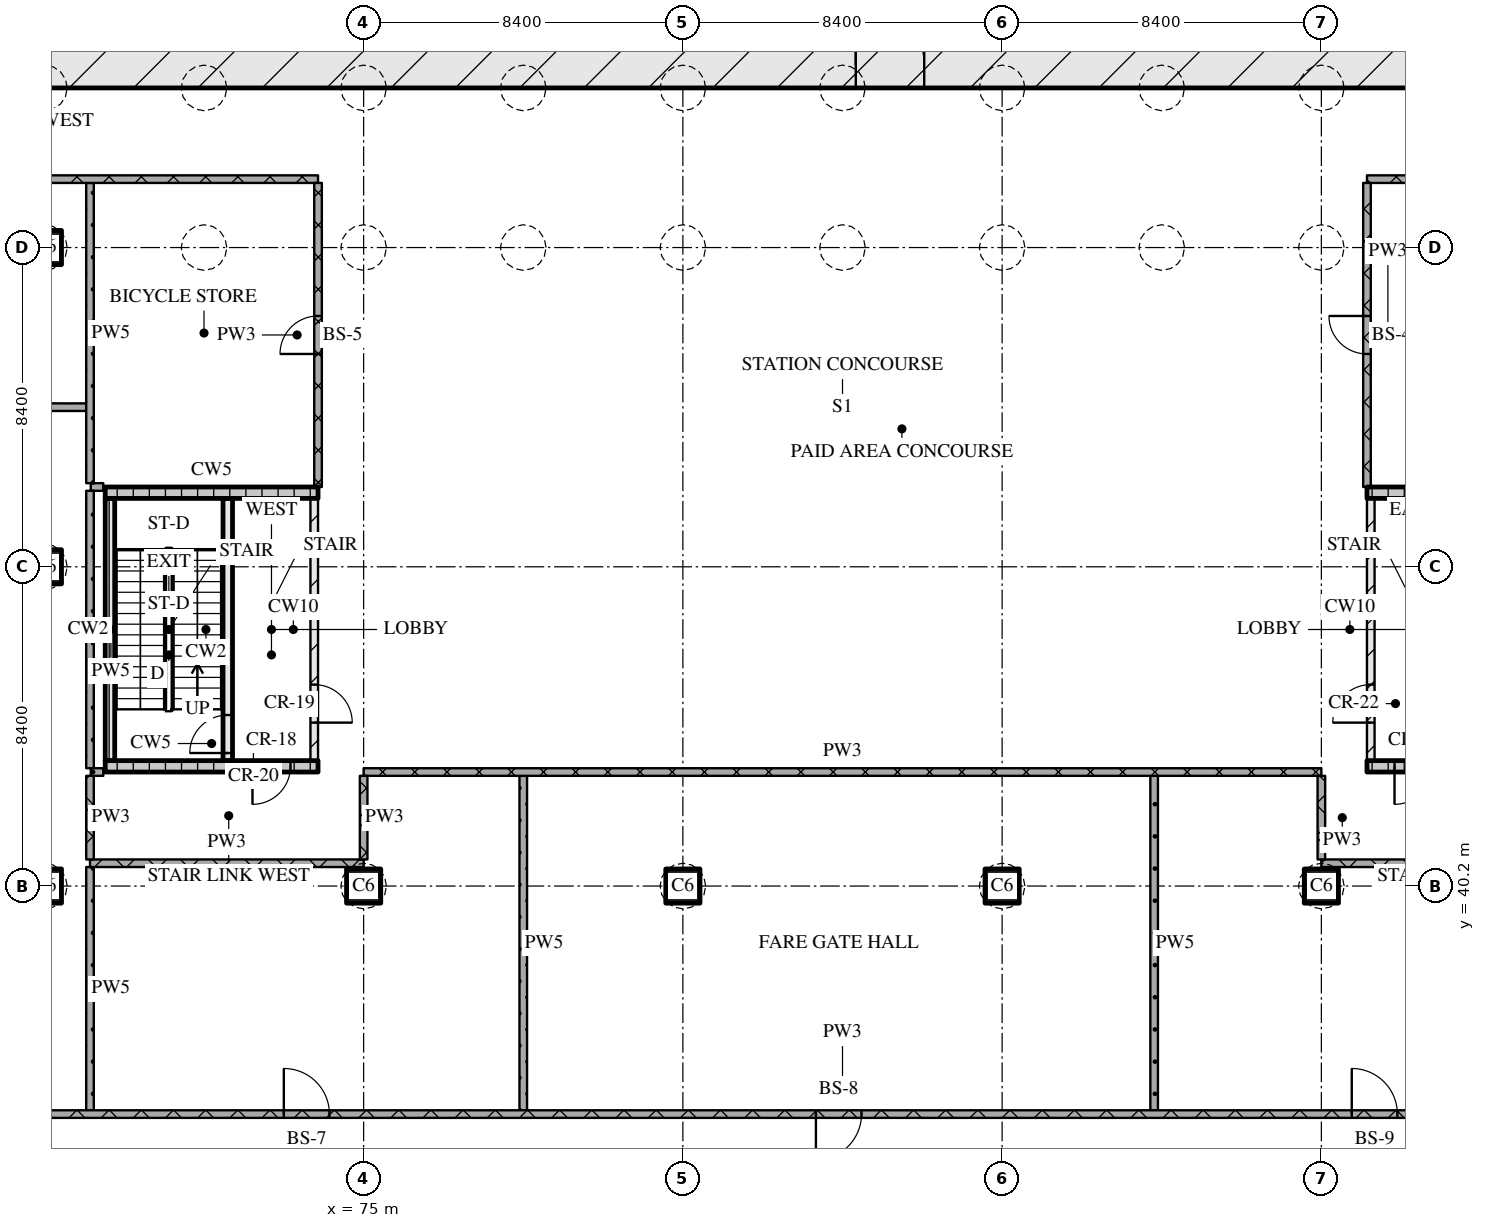
"""IFC4 building model, lengths in metres.
Left out: names, types, materials, properties, quantities, classifications, styles, units other than length and angle.
Written with IfcOpenShell. Run it as: python <this file> out.ifc"""

import sys

from ifc_helpers import new_model, si_unit, direction, frame, frame_2d, origin, origin_2d, place, context, subcontext, project, spatial, rectangle, extrude, element, fill, save


model = new_model("IFC4")
c1 = context("Model", 3, precision=1e-05, world=origin(), true_north=direction((0.0, 1.0)))
c2 = subcontext(c1, "Body", "Model", "MODEL_VIEW")
j1 = project(units=[si_unit("LENGTHUNIT", "METRE"), si_unit("PLANEANGLEUNIT", "RADIAN")], contexts=[c1])
p1 = place(None, origin())
s1 = spatial("IfcSite", under=j1, at=p1, CompositionType="ELEMENT")
p2 = place(p1, origin())
s2 = spatial("IfcBuilding", under=s1, at=p2, CompositionType="ELEMENT")
p3 = place(p2, frame((0.0, 0.0, -6.0)))
s3 = spatial("IfcBuildingStorey", under=s2, at=p3, CompositionType="ELEMENT", Elevation=-6.0)
for number, where, z_axis, x_axis in (
    (1, (66.6, 40.2, 0.0), (0.0, 0.0, 1.0), (1.0, 0.0, 0.0)),
    (2, (66.6, 48.6, 0.0), (0.0, 0.0, 1.0), (1.0, 0.0, 0.0)),
    (3, (66.6, 57.0, 0.0), (0.0, 0.0, 1.0), (1.0, 0.0, 0.0)),
    (4, (75.0, 40.2, 0.0), (0.0, 0.0, 1.0), (1.0, 0.0, 0.0)),
    (5, (83.4, 40.2, 0.0), (0.0, 0.0, 1.0), (1.0, 0.0, 0.0)),
    (6, (91.8, 40.2, 0.0), (0.0, 0.0, 1.0), (1.0, 0.0, 0.0)),
    (7, (100.2, 40.2, 0.0), (0.0, 0.0, 1.0), (1.0, 0.0, 0.0)),
):
    element("IfcColumn", number, at=place(p3, frame(where, z_axis=z_axis, x_axis=x_axis)), inside=s3, PredefinedType="COLUMN", context=c2, shape_type="SweptSolid", body=[
        extrude(rectangle(XDim=0.9, YDim=0.9, at=origin_2d()), origin(), (0.0, 0.0, 1.0), 6.0),
    ])
p4 = place(p3, frame((66.6, 61.8, 0.0), z_axis=(0.0, 0.0, 1.0), x_axis=(1.0, 0.0, 0.0)))
e8 = element("IfcWall", 8, at=p4, inside=s3, PredefinedType="SOLIDWALL", context=c2, shape_type="SweptSolid", body=[
    extrude(rectangle(XDim=42.0, YDim=1.2, at=frame_2d((21.0, 0.0))), origin(), (0.0, 0.0, 1.0), 5.7),
])
p5 = place(p4, frame((21.35, 0.0, 0.0)))
e9 = element("IfcOpeningElement", 9, at=p5, cuts=e8, PredefinedType="OPENING", context=c2, shape_type="SweptSolid", body=[
    extrude(rectangle(XDim=1.8, YDim=2.1, at=frame_2d((0.9, 1.05))), frame((0.0, 0.61, 0.0), z_axis=(0.0, -1.0, 0.0), x_axis=(1.0, 0.0, 0.0)), (0.0, 0.0, 1.0), 1.22),
])
p6 = place(p3, frame((68.2, 43.35, 0.0), z_axis=(0.0, 0.0, 1.0), x_axis=(1.0, 0.0, 0.0)))
e10 = element("IfcWall", 10, at=p6, inside=s3, PredefinedType="SOLIDWALL", context=c2, shape_type="SweptSolid", body=[
    extrude(rectangle(XDim=5.6, YDim=0.3, at=frame_2d((2.8, 0.0))), origin(), (0.0, 0.0, 1.0), 5.7),
])
p7 = place(p6, frame((3.875, 0.0, 0.0)))
e11 = element("IfcOpeningElement", 11, at=p7, cuts=e10, PredefinedType="OPENING", context=c2, shape_type="SweptSolid", body=[
    extrude(rectangle(XDim=1.0, YDim=2.1, at=frame_2d((0.5, 1.05))), frame((0.0, 0.16, 0.0), z_axis=(0.0, -1.0, 0.0), x_axis=(1.0, 0.0, 0.0)), (0.0, 0.0, 1.0), 0.32),
])
p8 = place(p3, frame((68.325, 43.5, 0.0), z_axis=(0.0, 0.0, 1.0), x_axis=(0.0, 1.0, 0.0)))
e12 = element("IfcWall", 12, at=p8, inside=s3, PredefinedType="SOLIDWALL", context=c2, shape_type="SweptSolid", body=[
    extrude(rectangle(XDim=6.9, YDim=0.25, at=frame_2d((3.45, 0.0))), origin(), (0.0, 0.0, 1.0), 5.7),
])
p9 = place(p3, frame((71.425, 43.5, 0.0), z_axis=(0.0, 0.0, 1.0), x_axis=(0.0, 1.0, 0.0)))
e13 = element("IfcWall", 13, at=p9, inside=s3, PredefinedType="SOLIDWALL", context=c2, shape_type="SweptSolid", body=[
    extrude(rectangle(XDim=6.9, YDim=0.25, at=frame_2d((3.45, 0.0))), origin(), (0.0, 0.0, 1.0), 5.7),
])
p10 = place(p9, frame((0.2, 0.0, 0.0)))
e14 = element("IfcOpeningElement", 14, at=p10, cuts=e13, PredefinedType="OPENING", context=c2, shape_type="SweptSolid", body=[
    extrude(rectangle(XDim=1.0, YDim=2.1, at=frame_2d((0.5, 1.05))), frame((0.0, 0.135, 0.0), z_axis=(0.0, -1.0, 0.0), x_axis=(1.0, 0.0, 0.0)), (0.0, 0.0, 1.0), 0.27),
])
p11 = place(p3, frame((73.7, 43.5, 0.0), z_axis=(0.0, 0.0, 1.0), x_axis=(0.0, 1.0, 0.0)))
e15 = element("IfcWall", 15, at=p11, inside=s3, PredefinedType="PARTITIONING", context=c2, shape_type="SweptSolid", body=[
    extrude(rectangle(XDim=6.9, YDim=0.2, at=frame_2d((3.45, 0.0))), origin(), (0.0, 0.0, 1.0), 5.7),
])
p12 = place(p11, frame((1.0, 0.0, 0.0)))
e16 = element("IfcOpeningElement", 16, at=p12, cuts=e15, PredefinedType="OPENING", context=c2, shape_type="SweptSolid", body=[
    extrude(rectangle(XDim=1.0, YDim=2.1, at=frame_2d((0.5, 1.05))), frame((0.0, 0.11, 0.0), z_axis=(0.0, -1.0, 0.0), x_axis=(1.0, 0.0, 0.0)), (0.0, 0.0, 1.0), 0.22),
])
p13 = place(p3, frame((68.2, 50.55, 0.0), z_axis=(0.0, 0.0, 1.0), x_axis=(1.0, 0.0, 0.0)))
e17 = element("IfcWall", 17, at=p13, inside=s3, PredefinedType="SOLIDWALL", context=c2, shape_type="SweptSolid", body=[
    extrude(rectangle(XDim=5.6, YDim=0.3, at=frame_2d((2.8, 0.0))), origin(), (0.0, 0.0, 1.0), 5.7),
])
p14 = place(p3, frame((101.4, 43.35, 0.0), z_axis=(0.0, 0.0, 1.0), x_axis=(1.0, 0.0, 0.0)))
e18 = element("IfcWall", 18, at=p14, inside=s3, PredefinedType="SOLIDWALL", context=c2, shape_type="SweptSolid", body=[
    extrude(rectangle(XDim=5.6, YDim=0.3, at=frame_2d((2.8, 0.0))), origin(), (0.0, 0.0, 1.0), 5.7),
])
p15 = place(p14, frame((0.725, 0.0, 0.0)))
e19 = element("IfcOpeningElement", 19, at=p15, cuts=e18, PredefinedType="OPENING", context=c2, shape_type="SweptSolid", body=[
    extrude(rectangle(XDim=1.0, YDim=2.1, at=frame_2d((0.5, 1.05))), frame((0.0, 0.16, 0.0), z_axis=(0.0, -1.0, 0.0), x_axis=(1.0, 0.0, 0.0)), (0.0, 0.0, 1.0), 0.32),
])
p16 = place(p3, frame((101.5, 43.5, 0.0), z_axis=(0.0, 0.0, 1.0), x_axis=(0.0, 1.0, 0.0)))
e20 = element("IfcWall", 20, at=p16, inside=s3, PredefinedType="PARTITIONING", context=c2, shape_type="SweptSolid", body=[
    extrude(rectangle(XDim=6.9, YDim=0.2, at=frame_2d((3.45, 0.0))), origin(), (0.0, 0.0, 1.0), 5.7),
])
p17 = place(p16, frame((1.0, 0.0, 0.0)))
e21 = element("IfcOpeningElement", 21, at=p17, cuts=e20, PredefinedType="OPENING", context=c2, shape_type="SweptSolid", body=[
    extrude(rectangle(XDim=1.0, YDim=2.1, at=frame_2d((0.5, 1.05))), frame((0.0, 0.11, 0.0), z_axis=(0.0, -1.0, 0.0), x_axis=(1.0, 0.0, 0.0)), (0.0, 0.0, 1.0), 0.22),
])
p18 = place(p3, frame((101.4, 50.55, 0.0), z_axis=(0.0, 0.0, 1.0), x_axis=(1.0, 0.0, 0.0)))
e22 = element("IfcWall", 22, at=p18, inside=s3, PredefinedType="SOLIDWALL", context=c2, shape_type="SweptSolid", body=[
    extrude(rectangle(XDim=5.6, YDim=0.3, at=frame_2d((2.8, 0.0))), origin(), (0.0, 0.0, 1.0), 5.7),
])
p19 = place(p3, frame((43.8, 34.2, 0.0), z_axis=(0.0, 0.0, 1.0), x_axis=(1.0, 0.0, 0.0)))
e23 = element("IfcWall", 23, at=p19, inside=s3, PredefinedType="PARTITIONING", context=c2, shape_type="SweptSolid", body=[
    extrude(rectangle(XDim=87.6, YDim=0.2, at=frame_2d((43.8, 0.0))), origin(), (0.0, 0.0, 1.0), 5.7),
])
p20 = place(p19, frame((29.1, 0.0, 0.0)))
e24 = element("IfcOpeningElement", 24, at=p20, cuts=e23, PredefinedType="OPENING", context=c2, shape_type="SweptSolid", body=[
    extrude(rectangle(XDim=1.2, YDim=2.1, at=frame_2d((0.6, 1.05))), frame((0.0, 0.11, 0.0), z_axis=(0.0, -1.0, 0.0), x_axis=(1.0, 0.0, 0.0)), (0.0, 0.0, 1.0), 0.22),
])
p21 = place(p19, frame((43.1, 0.0, 0.0)))
e25 = element("IfcOpeningElement", 25, at=p21, cuts=e23, PredefinedType="OPENING", context=c2, shape_type="SweptSolid", body=[
    extrude(rectangle(XDim=1.2, YDim=2.1, at=frame_2d((0.6, 1.05))), frame((0.0, 0.11, 0.0), z_axis=(0.0, -1.0, 0.0), x_axis=(1.0, 0.0, 0.0)), (0.0, 0.0, 1.0), 0.22),
])
p22 = place(p19, frame((57.2, 0.0, 0.0)))
e26 = element("IfcOpeningElement", 26, at=p22, cuts=e23, PredefinedType="OPENING", context=c2, shape_type="SweptSolid", body=[
    extrude(rectangle(XDim=1.2, YDim=2.1, at=frame_2d((0.6, 1.05))), frame((0.0, 0.11, 0.0), z_axis=(0.0, -1.0, 0.0), x_axis=(1.0, 0.0, 0.0)), (0.0, 0.0, 1.0), 0.22),
])
p23 = place(p19, frame((75.0, 0.0, 0.0)))
e27 = element("IfcOpeningElement", 27, at=p23, cuts=e23, PredefinedType="OPENING", context=c2, shape_type="SweptSolid", body=[
    extrude(rectangle(XDim=1.2, YDim=2.1, at=frame_2d((0.6, 1.05))), frame((0.0, 0.11, 0.0), z_axis=(0.0, -1.0, 0.0), x_axis=(1.0, 0.0, 0.0)), (0.0, 0.0, 1.0), 0.22),
])
for number, where, z_axis, x_axis in (
    (28, (67.8, 40.8, 0.0), (0.0, 0.0, 1.0), (1.0, 0.0, 0.0)),
    (29, (100.2, 40.8, 0.0), (0.0, 0.0, 1.0), (1.0, 0.0, 0.0)),
):
    element("IfcWall", number, at=place(p3, frame(where, z_axis=z_axis, x_axis=x_axis)), inside=s3, PredefinedType="PARTITIONING", context=c2, shape_type="SweptSolid", body=[
        extrude(rectangle(XDim=7.2, YDim=0.2, at=frame_2d((3.6, 0.0))), origin(), (0.0, 0.0, 1.0), 5.7),
    ])
p24 = place(p3, frame((75.0, 43.2, 0.0), z_axis=(0.0, 0.0, 1.0), x_axis=(1.0, 0.0, 0.0)))
e30 = element("IfcWall", 30, at=p24, inside=s3, PredefinedType="PARTITIONING", context=c2, shape_type="SweptSolid", body=[
    extrude(rectangle(XDim=25.2, YDim=0.2, at=frame_2d((12.6, 0.0))), origin(), (0.0, 0.0, 1.0), 5.7),
])
for number, where, z_axis, x_axis in (
    (31, (67.82, 43.2, 0.0), (0.0, 0.0, 1.0), (1.0, 0.0, 0.0)),
    (32, (67.82, 50.7, 0.0), (0.0, 0.0, 1.0), (1.0, 0.0, 0.0)),
):
    element("IfcWall", number, at=place(p3, frame(where, z_axis=z_axis, x_axis=x_axis)), inside=s3, PredefinedType="PARTITIONING", context=c2, shape_type="SweptSolid", body=[
        extrude(rectangle(XDim=0.33, YDim=0.2, at=frame_2d((0.165, 0.0))), origin(), (0.0, 0.0, 1.0), 5.7),
    ])
p25 = place(p3, frame((43.9, 52.8, 0.0), z_axis=(0.0, 0.0, 1.0), x_axis=(1.0, 0.0, 0.0)))
e33 = element("IfcWall", 33, at=p25, inside=s3, PredefinedType="PARTITIONING", context=c2, shape_type="SweptSolid", body=[
    extrude(rectangle(XDim=23.8, YDim=0.2, at=frame_2d((11.9, 0.0))), origin(), (0.0, 0.0, 1.0), 5.7),
])
p26 = place(p3, frame((73.8, 58.8, 0.0), z_axis=(0.0, 0.0, 1.0), x_axis=(-1.0, 0.0, 0.0)))
e34 = element("IfcWall", 34, at=p26, inside=s3, PredefinedType="PARTITIONING", context=c2, shape_type="SweptSolid", body=[
    extrude(rectangle(XDim=30.0, YDim=0.2, at=frame_2d((15.0, 0.0))), origin(), (0.0, 0.0, 1.0), 5.7),
])
p27 = place(p26, frame((17.4, 0.0, 0.0)))
e35 = element("IfcOpeningElement", 35, at=p27, cuts=e34, PredefinedType="OPENING", context=c2, shape_type="SweptSolid", body=[
    extrude(rectangle(XDim=1.2, YDim=2.1, at=frame_2d((0.6, 1.05))), frame((0.0, 0.11, 0.0), z_axis=(0.0, -1.0, 0.0), x_axis=(1.0, 0.0, 0.0)), (0.0, 0.0, 1.0), 0.22),
])
p28 = place(p3, frame((131.4, 58.8, 0.0), z_axis=(0.0, 0.0, 1.0), x_axis=(-1.0, 0.0, 0.0)))
e36 = element("IfcWall", 36, at=p28, inside=s3, PredefinedType="PARTITIONING", context=c2, shape_type="SweptSolid", body=[
    extrude(rectangle(XDim=30.0, YDim=0.2, at=frame_2d((15.0, 0.0))), origin(), (0.0, 0.0, 1.0), 5.7),
])
p29 = place(p28, frame((11.4, 0.0, 0.0)))
e37 = element("IfcOpeningElement", 37, at=p29, cuts=e36, PredefinedType="OPENING", context=c2, shape_type="SweptSolid", body=[
    extrude(rectangle(XDim=1.2, YDim=2.1, at=frame_2d((0.6, 1.05))), frame((0.0, 0.11, 0.0), z_axis=(0.0, -1.0, 0.0), x_axis=(1.0, 0.0, 0.0)), (0.0, 0.0, 1.0), 0.22),
])
p30 = place(p3, frame((67.8, 43.1, 0.0), z_axis=(0.0, 0.0, 1.0), x_axis=(0.0, -1.0, 0.0)))
e38 = element("IfcWall", 38, at=p30, inside=s3, PredefinedType="PARTITIONING", context=c2, shape_type="SweptSolid", body=[
    extrude(rectangle(XDim=2.2, YDim=0.2, at=frame_2d((1.1, 0.0))), origin(), (0.0, 0.0, 1.0), 5.7),
])
p31 = place(p3, frame((67.8, 50.6, 0.0), z_axis=(0.0, 0.0, 1.0), x_axis=(0.0, -1.0, 0.0)))
e39 = element("IfcWall", 39, at=p31, inside=s3, PredefinedType="PARTITIONING", context=c2, shape_type="SweptSolid", body=[
    extrude(rectangle(XDim=7.3, YDim=0.2, at=frame_2d((3.65, 0.0))), origin(), (0.0, 0.0, 1.0), 5.7),
])
p32 = place(p3, frame((67.8, 40.7, 0.0), z_axis=(0.0, 0.0, 1.0), x_axis=(0.0, -1.0, 0.0)))
e40 = element("IfcWall", 40, at=p32, inside=s3, PredefinedType="PARTITIONING", context=c2, shape_type="SweptSolid", body=[
    extrude(rectangle(XDim=6.4, YDim=0.2, at=frame_2d((3.2, 0.0))), origin(), (0.0, 0.0, 1.0), 5.7),
])
p33 = place(p3, frame((67.8, 58.7, 0.0), z_axis=(0.0, 0.0, 1.0), x_axis=(0.0, -1.0, 0.0)))
e41 = element("IfcWall", 41, at=p33, inside=s3, PredefinedType="PARTITIONING", context=c2, shape_type="SweptSolid", body=[
    extrude(rectangle(XDim=7.9, YDim=0.2, at=frame_2d((3.95, 0.0))), origin(), (0.0, 0.0, 1.0), 5.7),
])
p34 = place(p3, frame((73.8, 50.7, 0.0), z_axis=(0.0, 0.0, 1.0), x_axis=(0.0, 1.0, 0.0)))
e42 = element("IfcWall", 42, at=p34, inside=s3, PredefinedType="PARTITIONING", context=c2, shape_type="SweptSolid", body=[
    extrude(rectangle(XDim=8.0, YDim=0.2, at=frame_2d((4.0, 0.0))), origin(), (0.0, 0.0, 1.0), 5.7),
])
p35 = place(p34, frame((3.5, 0.0, 0.0)))
e43 = element("IfcOpeningElement", 43, at=p35, cuts=e42, PredefinedType="OPENING", context=c2, shape_type="SweptSolid", body=[
    extrude(rectangle(XDim=1.0, YDim=2.1, at=frame_2d((0.5, 1.05))), frame((0.0, 0.11, 0.0), z_axis=(0.0, -1.0, 0.0), x_axis=(1.0, 0.0, 0.0)), (0.0, 0.0, 1.0), 0.22),
])
p36 = place(p3, frame((75.0, 43.1, 0.0), z_axis=(0.0, 0.0, 1.0), x_axis=(0.0, -1.0, 0.0)))
e44 = element("IfcWall", 44, at=p36, inside=s3, PredefinedType="PARTITIONING", context=c2, shape_type="SweptSolid", body=[
    extrude(rectangle(XDim=2.2, YDim=0.2, at=frame_2d((1.1, 0.0))), origin(), (0.0, 0.0, 1.0), 5.7),
])
for number, where, z_axis, x_axis in (
    (45, (79.2, 43.1, 0.0), (0.0, 0.0, 1.0), (0.0, -1.0, 0.0)),
    (46, (95.8, 43.1, 0.0), (0.0, 0.0, 1.0), (0.0, -1.0, 0.0)),
):
    element("IfcWall", number, at=place(p3, frame(where, z_axis=z_axis, x_axis=x_axis)), inside=s3, PredefinedType="PARTITIONING", context=c2, shape_type="SweptSolid", body=[
        extrude(rectangle(XDim=8.8, YDim=0.2, at=frame_2d((4.4, 0.0))), origin(), (0.0, 0.0, 1.0), 5.7),
    ])
p37 = place(p3, frame((100.2, 43.1, 0.0), z_axis=(0.0, 0.0, 1.0), x_axis=(0.0, -1.0, 0.0)))
e47 = element("IfcWall", 47, at=p37, inside=s3, PredefinedType="PARTITIONING", context=c2, shape_type="SweptSolid", body=[
    extrude(rectangle(XDim=2.2, YDim=0.2, at=frame_2d((1.1, 0.0))), origin(), (0.0, 0.0, 1.0), 5.7),
])
p38 = place(p3, frame((101.4, 58.7, 0.0), z_axis=(0.0, 0.0, 1.0), x_axis=(0.0, -1.0, 0.0)))
e48 = element("IfcWall", 48, at=p38, inside=s3, PredefinedType="PARTITIONING", context=c2, shape_type="SweptSolid", body=[
    extrude(rectangle(XDim=8.0, YDim=0.2, at=frame_2d((4.0, 0.0))), origin(), (0.0, 0.0, 1.0), 5.7),
])
p39 = place(p38, frame((3.5, 0.0, 0.0)))
e49 = element("IfcOpeningElement", 49, at=p39, cuts=e48, PredefinedType="OPENING", context=c2, shape_type="SweptSolid", body=[
    extrude(rectangle(XDim=1.0, YDim=2.1, at=frame_2d((0.5, 1.05))), frame((0.0, 0.11, 0.0), z_axis=(0.0, -1.0, 0.0), x_axis=(1.0, 0.0, 0.0)), (0.0, 0.0, 1.0), 0.22),
])
p40 = place(p5, origin())
e50 = element("IfcDoor", 50, at=p40, inside=s3, OperationType="DOUBLE_DOOR_SINGLE_SWING", PredefinedType="DOOR", context=c2, shape_type="SweptSolid", body=[
    extrude(rectangle(XDim=1.8, YDim=2.1, at=frame_2d((0.9, 1.05))), frame((0.0, 0.025, 0.0), z_axis=(0.0, -1.0, 0.0), x_axis=(1.0, 0.0, 0.0)), (0.0, 0.0, 1.0), 0.05),
])
fill(e9, e50)
p41 = place(p7, origin())
e51 = element("IfcDoor", 51, at=p41, inside=s3, OperationType="SINGLE_SWING_RIGHT", PredefinedType="DOOR", context=c2, shape_type="SweptSolid", body=[
    extrude(rectangle(XDim=1.0, YDim=2.1, at=frame_2d((0.5, 1.05))), frame((0.0, 0.025, 0.0), z_axis=(0.0, -1.0, 0.0), x_axis=(1.0, 0.0, 0.0)), (0.0, 0.0, 1.0), 0.05),
])
fill(e11, e51)
p42 = place(p10, origin())
e52 = element("IfcDoor", 52, at=p42, inside=s3, OperationType="SINGLE_SWING_LEFT", PredefinedType="DOOR", context=c2, shape_type="SweptSolid", body=[
    extrude(rectangle(XDim=1.0, YDim=2.1, at=frame_2d((0.5, 1.05))), frame((0.0, 0.025, 0.0), z_axis=(0.0, -1.0, 0.0), x_axis=(1.0, 0.0, 0.0)), (0.0, 0.0, 1.0), 0.05),
])
fill(e14, e52)
p43 = place(p12, origin())
e53 = element("IfcDoor", 53, at=p43, inside=s3, OperationType="SINGLE_SWING_RIGHT", PredefinedType="DOOR", context=c2, shape_type="SweptSolid", body=[
    extrude(rectangle(XDim=1.0, YDim=2.1, at=frame_2d((0.5, 1.05))), frame((0.0, 0.025, 0.0), z_axis=(0.0, -1.0, 0.0), x_axis=(1.0, 0.0, 0.0)), (0.0, 0.0, 1.0), 0.05),
])
fill(e16, e53)
p44 = place(p15, origin())
e54 = element("IfcDoor", 54, at=p44, inside=s3, OperationType="SINGLE_SWING_RIGHT", PredefinedType="DOOR", context=c2, shape_type="SweptSolid", body=[
    extrude(rectangle(XDim=1.0, YDim=2.1, at=frame_2d((0.5, 1.05))), frame((0.0, 0.025, 0.0), z_axis=(0.0, -1.0, 0.0), x_axis=(1.0, 0.0, 0.0)), (0.0, 0.0, 1.0), 0.05),
])
fill(e19, e54)
p45 = place(p17, origin())
e55 = element("IfcDoor", 55, at=p45, inside=s3, OperationType="SINGLE_SWING_LEFT", PredefinedType="DOOR", context=c2, shape_type="SweptSolid", body=[
    extrude(rectangle(XDim=1.0, YDim=2.1, at=frame_2d((0.5, 1.05))), frame((0.0, 0.025, 0.0), z_axis=(0.0, -1.0, 0.0), x_axis=(1.0, 0.0, 0.0)), (0.0, 0.0, 1.0), 0.05),
])
fill(e21, e55)
p46 = place(p20, origin())
e56 = element("IfcDoor", 56, at=p46, inside=s3, OperationType="SINGLE_SWING_LEFT", PredefinedType="DOOR", context=c2, shape_type="SweptSolid", body=[
    extrude(rectangle(XDim=1.2, YDim=2.1, at=frame_2d((0.6, 1.05))), frame((0.0, 0.025, 0.0), z_axis=(0.0, -1.0, 0.0), x_axis=(1.0, 0.0, 0.0)), (0.0, 0.0, 1.0), 0.05),
])
fill(e24, e56)
p47 = place(p21, origin())
e57 = element("IfcDoor", 57, at=p47, inside=s3, OperationType="SINGLE_SWING_RIGHT", PredefinedType="DOOR", context=c2, shape_type="SweptSolid", body=[
    extrude(rectangle(XDim=1.2, YDim=2.1, at=frame_2d((0.6, 1.05))), frame((0.0, 0.025, 0.0), z_axis=(0.0, -1.0, 0.0), x_axis=(1.0, 0.0, 0.0)), (0.0, 0.0, 1.0), 0.05),
])
fill(e25, e57)
p48 = place(p22, origin())
e58 = element("IfcDoor", 58, at=p48, inside=s3, OperationType="SINGLE_SWING_LEFT", PredefinedType="DOOR", context=c2, shape_type="SweptSolid", body=[
    extrude(rectangle(XDim=1.2, YDim=2.1, at=frame_2d((0.6, 1.05))), frame((0.0, 0.025, 0.0), z_axis=(0.0, -1.0, 0.0), x_axis=(1.0, 0.0, 0.0)), (0.0, 0.0, 1.0), 0.05),
])
fill(e26, e58)
p49 = place(p35, origin())
e59 = element("IfcDoor", 59, at=p49, inside=s3, OperationType="SINGLE_SWING_LEFT", PredefinedType="DOOR", context=c2, shape_type="SweptSolid", body=[
    extrude(rectangle(XDim=1.0, YDim=2.1, at=frame_2d((0.5, 1.05))), frame((0.0, 0.025, 0.0), z_axis=(0.0, -1.0, 0.0), x_axis=(1.0, 0.0, 0.0)), (0.0, 0.0, 1.0), 0.05),
])
fill(e43, e59)
p50 = place(p39, origin())
e60 = element("IfcDoor", 60, at=p50, inside=s3, OperationType="SINGLE_SWING_RIGHT", PredefinedType="DOOR", context=c2, shape_type="SweptSolid", body=[
    extrude(rectangle(XDim=1.0, YDim=2.1, at=frame_2d((0.5, 1.05))), frame((0.0, 0.025, 0.0), z_axis=(0.0, -1.0, 0.0), x_axis=(1.0, 0.0, 0.0)), (0.0, 0.0, 1.0), 0.05),
])
fill(e49, e60)
save(model, sys.argv[1])
